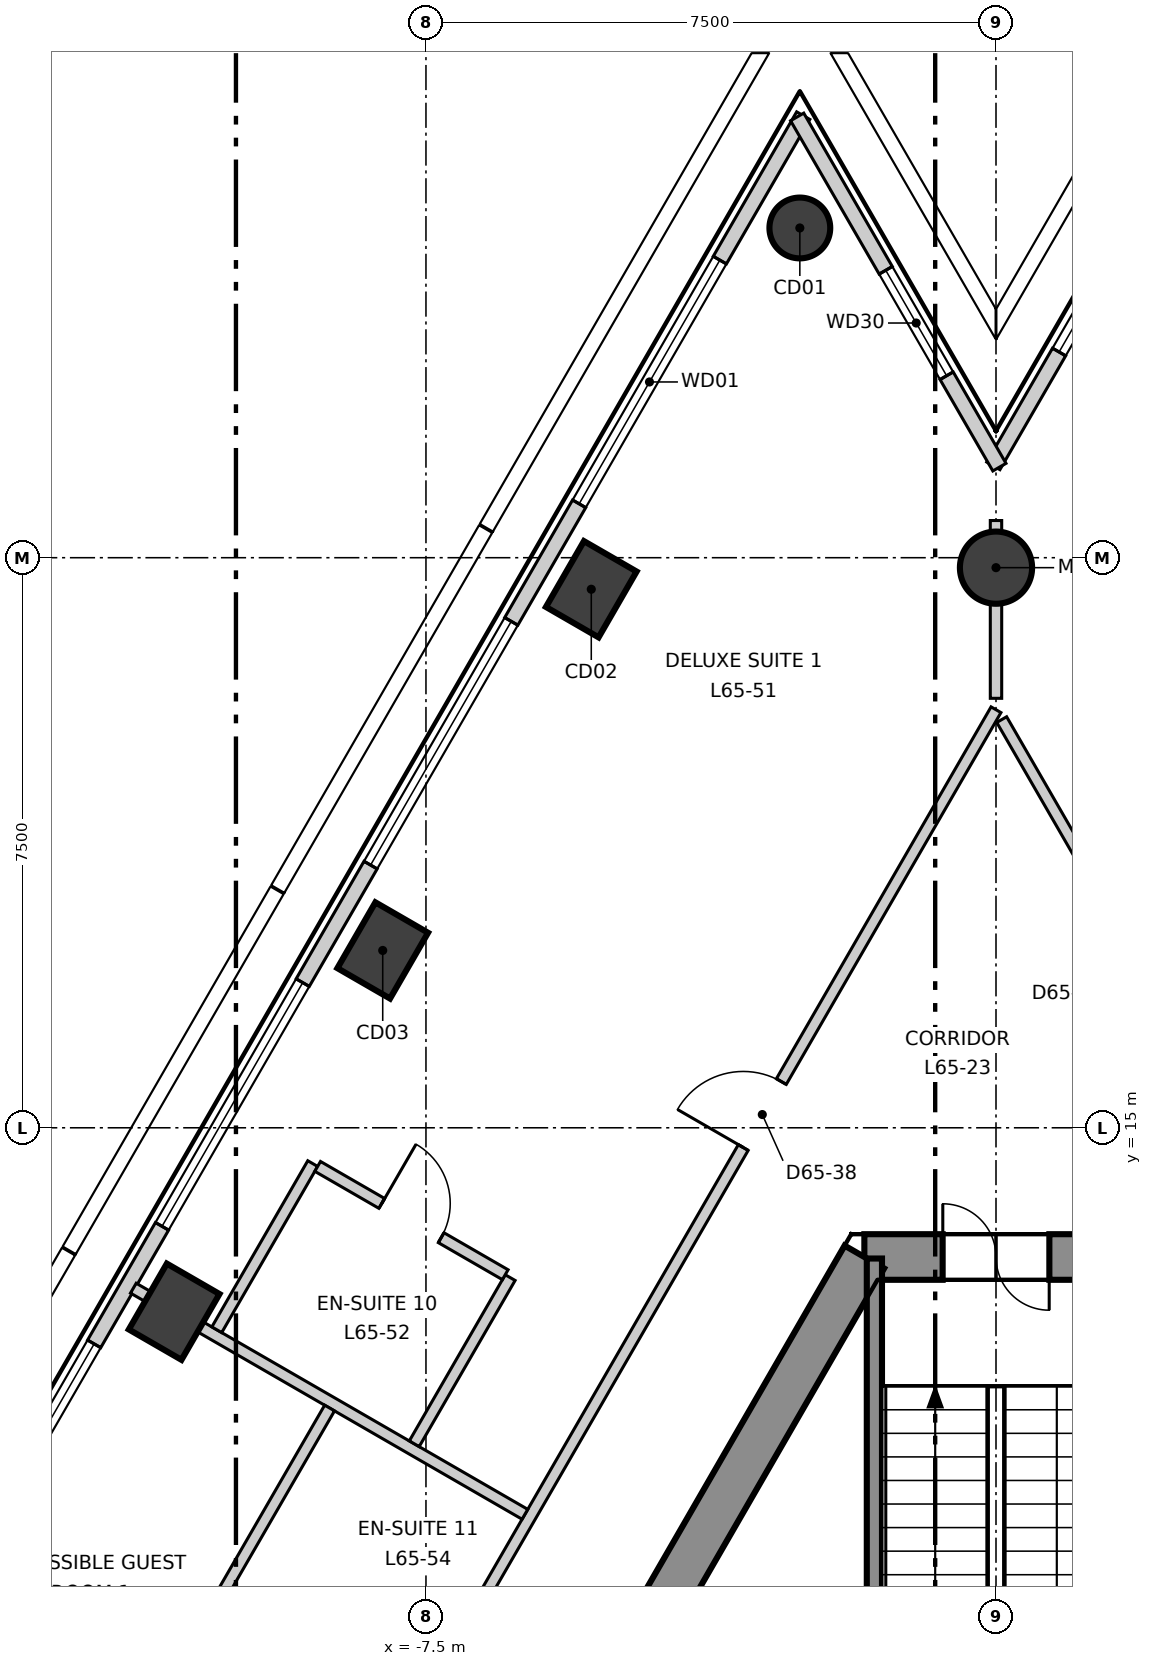
"""IFC4 building model, lengths in metres.
Left out: names, types, materials, properties, quantities, classifications, styles, units other than length and angle.
Written with IfcOpenShell. Run it as: python <this file> out.ifc"""

import sys

from ifc_helpers import new_model, si_unit, direction, frame, frame_2d, origin, origin_2d, place, context, subcontext, project, spatial, polyline, rectangle, circle, outline, extrude, element, fill, save


model = new_model("IFC4")
c1 = context("Model", 3, precision=1e-05, world=origin(), true_north=direction((0.0, 1.0)))
c2 = subcontext(c1, "Body", "Model", "MODEL_VIEW")
j1 = project(units=[si_unit("LENGTHUNIT", "METRE"), si_unit("PLANEANGLEUNIT", "RADIAN")], contexts=[c1])
p1 = place(None, origin())
s1 = spatial("IfcSite", under=j1, at=p1, CompositionType="ELEMENT")
p2 = place(p1, origin())
s2 = spatial("IfcBuilding", under=s1, at=p2, CompositionType="ELEMENT")
p3 = place(p2, frame((0.0, 0.0, 279.1)))
s3 = spatial("IfcBuildingStorey", under=s2, at=p3, CompositionType="ELEMENT", Elevation=279.1)
p4 = place(p3, frame((1.732, 13.3, -0.3), z_axis=(0.0, 0.0, 1.0), x_axis=(-1.0, 0.0, 0.0)))
e1 = element("IfcWall", 1, at=p4, inside=s3, PredefinedType="SHEAR", context=c2, shape_type="SweptSolid", body=[
    extrude(outline(polyline([(-0.173, -0.3), (1.732, -0.3), (3.637, -0.3), (3.291, 0.3), (1.732, 0.3), (0.173, 0.3), (-0.173, -0.3)])), origin(), (0.0, 0.0, 1.0), 3.6),
])
p5 = place(p4, frame((1.032, 0.0, 0.3)))
e2 = element("IfcOpeningElement", 2, at=p5, cuts=e1, PredefinedType="OPENING", context=c2, shape_type="SweptSolid", body=[
    extrude(rectangle(XDim=1.4, YDim=2.1, at=frame_2d((0.7, 1.05))), frame((0.0, 0.31, 0.0), z_axis=(0.0, -1.0, 0.0), x_axis=(1.0, 0.0, 0.0)), (0.0, 0.0, 1.0), 0.62),
])
p6 = place(p3, frame((-1.732, 13.3, -0.3), z_axis=(0.0, 0.0, 1.0), x_axis=(-0.500000539815, -0.866025092122, 0.0)))
e3 = element("IfcWall", 3, at=p6, inside=s3, PredefinedType="SHEAR", context=c2, shape_type="SweptSolid", body=[
    extrude(outline(polyline([(-0.173, -0.3), (1.795, -0.3), (3.763, -0.3), (5.732, -0.3), (7.7, -0.3), (9.668, -0.301), (11.637, -0.301), (13.605, -0.301), (15.573, -0.301), (17.542, -0.301), (19.51, -0.301), (21.478, -0.301), (21.131, 0.3), (19.226, 0.3), (17.321, 0.3), (15.415, 0.3), (13.51, 0.3), (11.605, 0.3), (9.699, 0.3), (7.794, 0.3), (5.889, 0.3), (3.984, 0.3), (2.078, 0.3), (0.173, 0.3), (-0.173, -0.3)])), origin(), (0.0, 0.0, 1.0), 3.6),
])
p7 = place(p6, frame((10.102, 0.0, 0.3)))
e4 = element("IfcOpeningElement", 4, at=p7, cuts=e3, PredefinedType="OPENING", context=c2, shape_type="SweptSolid", body=[
    extrude(rectangle(XDim=1.1, YDim=2.1, at=frame_2d((0.55, 1.05))), frame((0.0, 0.31, 0.0), z_axis=(0.0, -1.0, 0.0), x_axis=(1.0, 0.0, 0.0)), (0.0, 0.0, 1.0), 0.621),
])
p8 = place(p6, frame((15.627, 0.0, 0.3)))
e5 = element("IfcOpeningElement", 5, at=p8, cuts=e3, PredefinedType="OPENING", context=c2, shape_type="SweptSolid", body=[
    extrude(rectangle(XDim=0.9, YDim=2.1, at=frame_2d((0.45, 1.05))), frame((0.0, 0.31, 0.0), z_axis=(0.0, -1.0, 0.0), x_axis=(1.0, 0.0, 0.0)), (0.0, 0.0, 1.0), 0.621),
])
p9 = place(p3, frame((-2.581, 26.838, -0.3), z_axis=(0.0, 0.0, 1.0), x_axis=(0.5, 0.866025403784, 0.0)))
e6 = element("IfcColumn", 6, at=p9, inside=s3, PredefinedType="COLUMN", context=c2, shape_type="SweptSolid", body=[
    extrude(circle(Radius=0.4, at=origin_2d()), origin(), (0.0, 0.0, 1.0), 3.6),
])
for number, where, z_axis, x_axis in (
    (7, (-5.325, 22.085, -0.3), (0.0, 0.0, 1.0), (0.5, 0.866, 0.0)),
    (8, (-8.069, 17.333, -0.3), (0.0, 0.0, 1.0), (0.5, 0.866, 0.0)),
    (9, (-10.813, 12.58, -0.3), (0.0, 0.0, 1.0), (0.5, 0.866, 0.0)),
):
    element("IfcColumn", number, at=place(p3, frame(where, z_axis=z_axis, x_axis=x_axis)), inside=s3, PredefinedType="COLUMN", context=c2, shape_type="SweptSolid", body=[
        extrude(rectangle(XDim=1.0, YDim=0.8, at=origin_2d()), origin(), (0.0, 0.0, 1.0), 3.6),
    ])
p10 = place(p3, frame((0.0, 22.369, -0.3), z_axis=(0.0, 0.0, 1.0), x_axis=(1.0, 0.0, 0.0)))
e10 = element("IfcColumn", 10, at=p10, inside=s3, PredefinedType="COLUMN", context=c2, shape_type="SweptSolid", body=[
    extrude(circle(Radius=0.475, at=origin_2d()), origin(), (0.0, 0.0, 1.0), 3.6),
])
p11 = place(p3, frame((-2.536, 28.316, 0.0), z_axis=(0.0, 0.0, 1.0), x_axis=(-0.500006870765, -0.86602143691, 0.0)))
e11 = element("IfcWall", 11, at=p11, inside=s3, PredefinedType="ELEMENTEDWALL", context=c2, shape_type="SweptSolid", body=[
    extrude(rectangle(XDim=46.49, YDim=0.2, at=frame_2d((23.245, 0.0))), origin(), (0.0, 0.0, 1.0), 3.3),
])
p12 = place(p11, frame((2.196, 0.0, 0.9)))
e12 = element("IfcOpeningElement", 12, at=p12, cuts=e11, PredefinedType="OPENING", context=c2, shape_type="SweptSolid", body=[
    extrude(rectangle(XDim=3.7, YDim=2.2, at=frame_2d((1.85, 1.1))), frame((0.0, 0.11, 0.0), z_axis=(0.0, -1.0, 0.0), x_axis=(1.0, 0.0, 0.0)), (0.0, 0.0, 1.0), 0.22),
])
p13 = place(p11, frame((7.684, 0.0, 0.9)))
e13 = element("IfcOpeningElement", 13, at=p13, cuts=e11, PredefinedType="OPENING", context=c2, shape_type="SweptSolid", body=[
    extrude(rectangle(XDim=3.7, YDim=2.2, at=frame_2d((1.85, 1.1))), frame((0.0, 0.11, 0.0), z_axis=(0.0, -1.0, 0.0), x_axis=(1.0, 0.0, 0.0)), (0.0, 0.0, 1.0), 0.22),
])
p14 = place(p11, frame((13.172, 0.0, 0.9)))
e14 = element("IfcOpeningElement", 14, at=p14, cuts=e11, PredefinedType="OPENING", context=c2, shape_type="SweptSolid", body=[
    extrude(rectangle(XDim=3.7, YDim=2.2, at=frame_2d((1.85, 1.1))), frame((0.0, 0.11, 0.0), z_axis=(0.0, -1.0, 0.0), x_axis=(1.0, 0.0, 0.0)), (0.0, 0.0, 1.0), 0.22),
])
p15 = place(p11, frame((18.66, 0.0, 0.9)))
e15 = element("IfcOpeningElement", 15, at=p15, cuts=e11, PredefinedType="OPENING", context=c2, shape_type="SweptSolid", body=[
    extrude(rectangle(XDim=3.7, YDim=2.2, at=frame_2d((1.85, 1.1))), frame((0.0, 0.11, 0.0), z_axis=(0.0, -1.0, 0.0), x_axis=(1.0, 0.0, 0.0)), (0.0, 0.0, 1.0), 0.22),
])
p16 = place(p11, frame((24.148, 0.0, 0.9)))
e16 = element("IfcOpeningElement", 16, at=p16, cuts=e11, PredefinedType="OPENING", context=c2, shape_type="SweptSolid", body=[
    extrude(rectangle(XDim=3.7, YDim=2.2, at=frame_2d((1.85, 1.1))), frame((0.0, 0.11, 0.0), z_axis=(0.0, -1.0, 0.0), x_axis=(1.0, 0.0, 0.0)), (0.0, 0.0, 1.0), 0.22),
])
p17 = place(p11, frame((29.636, 0.0, 0.9)))
e17 = element("IfcOpeningElement", 17, at=p17, cuts=e11, PredefinedType="OPENING", context=c2, shape_type="SweptSolid", body=[
    extrude(rectangle(XDim=3.7, YDim=2.2, at=frame_2d((1.85, 1.1))), frame((0.0, 0.11, 0.0), z_axis=(0.0, -1.0, 0.0), x_axis=(1.0, 0.0, 0.0)), (0.0, 0.0, 1.0), 0.22),
])
p18 = place(p11, frame((35.124, 0.0, 0.9)))
e18 = element("IfcOpeningElement", 18, at=p18, cuts=e11, PredefinedType="OPENING", context=c2, shape_type="SweptSolid", body=[
    extrude(rectangle(XDim=3.7, YDim=2.2, at=frame_2d((1.85, 1.1))), frame((0.0, 0.11, 0.0), z_axis=(0.0, -1.0, 0.0), x_axis=(1.0, 0.0, 0.0)), (0.0, 0.0, 1.0), 0.22),
])
p19 = place(p11, frame((40.612, 0.0, 0.9)))
e19 = element("IfcOpeningElement", 19, at=p19, cuts=e11, PredefinedType="OPENING", context=c2, shape_type="SweptSolid", body=[
    extrude(rectangle(XDim=3.7, YDim=2.2, at=frame_2d((1.85, 1.1))), frame((0.0, 0.11, 0.0), z_axis=(0.0, -1.0, 0.0), x_axis=(1.0, 0.0, 0.0)), (0.0, 0.0, 1.0), 0.22),
])
p20 = place(p3, frame((2.626, 28.316, 0.0), z_axis=(0.0, 0.0, 1.0), x_axis=(-0.500071953966, -0.865983857157, 0.0)))
e20 = element("IfcWall", 20, at=p20, inside=s3, PredefinedType="ELEMENTEDWALL", context=c2, shape_type="SweptSolid", body=[
    extrude(rectangle(XDim=5.321, YDim=0.2, at=frame_2d((2.661, 0.0))), origin(), (0.0, 0.0, 1.0), 3.3),
])
p21 = place(p20, frame((1.99, 0.0, 0.9)))
e21 = element("IfcOpeningElement", 21, at=p21, cuts=e20, PredefinedType="OPENING", context=c2, shape_type="SweptSolid", body=[
    extrude(rectangle(XDim=1.6, YDim=2.2, at=frame_2d((0.8, 1.1))), frame((0.0, 0.11, 0.0), z_axis=(0.0, -1.0, 0.0), x_axis=(1.0, 0.0, 0.0)), (0.0, 0.0, 1.0), 0.22),
])
p22 = place(p3, frame((0.045, 23.691, 0.0), z_axis=(0.0, 0.0, 1.0), x_axis=(-0.500052085069, 0.865995330367, 0.0)))
e22 = element("IfcWall", 22, at=p22, inside=s3, PredefinedType="ELEMENTEDWALL", context=c2, shape_type="SweptSolid", body=[
    extrude(rectangle(XDim=5.321, YDim=0.2, at=frame_2d((2.661, 0.0))), origin(), (0.0, 0.0, 1.0), 3.3),
])
p23 = place(p22, frame((1.39, 0.0, 0.9)))
e23 = element("IfcOpeningElement", 23, at=p23, cuts=e22, PredefinedType="OPENING", context=c2, shape_type="SweptSolid", body=[
    extrude(rectangle(XDim=1.6, YDim=2.2, at=frame_2d((0.8, 1.1))), frame((0.0, 0.11, 0.0), z_axis=(0.0, -1.0, 0.0), x_axis=(1.0, 0.0, 0.0)), (0.0, 0.0, 1.0), 0.22),
])
p24 = place(p3, frame((-17.678, -10.119, 0.0), z_axis=(0.0, 0.0, 1.0), x_axis=(0.500003190174, 0.866023561929, 0.0)))
e24 = element("IfcWall", 24, at=p24, inside=s3, PredefinedType="PARTITIONING", context=c2, shape_type="SweptSolid", body=[
    extrude(rectangle(XDim=35.356, YDim=0.15, at=frame_2d((17.678, 0.0))), origin(), (0.0, 0.0, 1.0), 3.3),
])
p25 = place(p24, frame((28.706, 0.0, 0.0)))
e25 = element("IfcOpeningElement", 25, at=p25, cuts=e24, PredefinedType="OPENING", context=c2, shape_type="SweptSolid", body=[
    extrude(rectangle(XDim=1.0, YDim=2.1, at=frame_2d((0.5, 1.05))), frame((0.0, 0.085, 0.0), z_axis=(0.0, -1.0, 0.0), x_axis=(1.0, 0.0, 0.0)), (0.0, 0.0, 1.0), 0.17),
])
p26 = place(p24, frame((18.74, 0.0, 0.0)))
e26 = element("IfcOpeningElement", 26, at=p26, cuts=e24, PredefinedType="OPENING", context=c2, shape_type="SweptSolid", body=[
    extrude(rectangle(XDim=1.0, YDim=2.1, at=frame_2d((0.5, 1.05))), frame((0.0, 0.085, 0.0), z_axis=(0.0, -1.0, 0.0), x_axis=(1.0, 0.0, 0.0)), (0.0, 0.0, 1.0), 0.17),
])
p27 = place(p24, frame((9.352, 0.0, 0.0)))
e27 = element("IfcOpeningElement", 27, at=p27, cuts=e24, PredefinedType="OPENING", context=c2, shape_type="SweptSolid", body=[
    extrude(rectangle(XDim=1.0, YDim=2.1, at=frame_2d((0.5, 1.05))), frame((0.0, 0.085, 0.0), z_axis=(0.0, -1.0, 0.0), x_axis=(1.0, 0.0, 0.0)), (0.0, 0.0, 1.0), 0.17),
])
p28 = place(p24, frame((2.777, 0.0, 0.0)))
e28 = element("IfcOpeningElement", 28, at=p28, cuts=e24, PredefinedType="OPENING", context=c2, shape_type="SweptSolid", body=[
    extrude(rectangle(XDim=1.0, YDim=2.1, at=frame_2d((0.5, 1.05))), frame((0.0, 0.085, 0.0), z_axis=(0.0, -1.0, 0.0), x_axis=(1.0, 0.0, 0.0)), (0.0, 0.0, 1.0), 0.17),
])
p29 = place(p3, frame((-11.35, 12.89, 0.0), z_axis=(0.0, 0.0, 1.0), x_axis=(0.866004483474, -0.50003623329, 0.0)))
e29 = element("IfcWall", 29, at=p29, inside=s3, PredefinedType="PARTITIONING", context=c2, shape_type="SweptSolid", body=[
    extrude(rectangle(XDim=5.949, YDim=0.15, at=frame_2d((2.975, 0.0))), origin(), (0.0, 0.0, 1.0), 3.3),
])
p30 = place(p3, frame((0.0, 20.65, 0.0), z_axis=(0.0, 0.0, 1.0), x_axis=(0.0, 1.0, 0.0)))
e30 = element("IfcWall", 30, at=p30, inside=s3, PredefinedType="PARTITIONING", context=c2, shape_type="SweptSolid", body=[
    extrude(rectangle(XDim=2.339, YDim=0.15, at=frame_2d((1.169, 0.0))), origin(), (0.0, 0.0, 1.0), 2.8),
])
p31 = place(p3, frame((0.075, 20.37, 0.0), z_axis=(0.0, 0.0, 1.0), x_axis=(0.500003985697, -0.866023102629, 0.0)))
e31 = element("IfcWall", 31, at=p31, inside=s3, PredefinedType="PARTITIONING", context=c2, shape_type="SweptSolid", body=[
    extrude(rectangle(XDim=35.206, YDim=0.15, at=frame_2d((17.603, 0.0))), origin(), (0.0, 0.0, 1.0), 3.3),
])
p32 = place(p31, frame((31.506, 0.0, 0.0)))
e32 = element("IfcOpeningElement", 32, at=p32, cuts=e31, PredefinedType="OPENING", context=c2, shape_type="SweptSolid", body=[
    extrude(rectangle(XDim=1.0, YDim=2.1, at=frame_2d((0.5, 1.05))), frame((0.0, 0.085, 0.0), z_axis=(0.0, -1.0, 0.0), x_axis=(1.0, 0.0, 0.0)), (0.0, 0.0, 1.0), 0.17),
])
p33 = place(p31, frame((26.529, 0.0, 0.0)))
e33 = element("IfcOpeningElement", 33, at=p33, cuts=e31, PredefinedType="OPENING", context=c2, shape_type="SweptSolid", body=[
    extrude(rectangle(XDim=1.0, YDim=2.1, at=frame_2d((0.5, 1.05))), frame((0.0, 0.085, 0.0), z_axis=(0.0, -1.0, 0.0), x_axis=(1.0, 0.0, 0.0)), (0.0, 0.0, 1.0), 0.17),
])
p34 = place(p31, frame((19.442, 0.0, 0.0)))
e34 = element("IfcOpeningElement", 34, at=p34, cuts=e31, PredefinedType="OPENING", context=c2, shape_type="SweptSolid", body=[
    extrude(rectangle(XDim=1.0, YDim=2.1, at=frame_2d((0.5, 1.05))), frame((0.0, 0.085, 0.0), z_axis=(0.0, -1.0, 0.0), x_axis=(1.0, 0.0, 0.0)), (0.0, 0.0, 1.0), 0.17),
])
p35 = place(p31, frame((8.254, 0.0, 0.0)))
e35 = element("IfcOpeningElement", 35, at=p35, cuts=e31, PredefinedType="OPENING", context=c2, shape_type="SweptSolid", body=[
    extrude(rectangle(XDim=1.0, YDim=2.1, at=frame_2d((0.5, 1.05))), frame((0.0, 0.085, 0.0), z_axis=(0.0, -1.0, 0.0), x_axis=(1.0, 0.0, 0.0)), (0.0, 0.0, 1.0), 0.17),
])
p36 = place(p31, frame((13.754, 0.0, 0.0)))
e36 = element("IfcOpeningElement", 36, at=p36, cuts=e31, PredefinedType="OPENING", context=c2, shape_type="SweptSolid", body=[
    extrude(rectangle(XDim=0.9, YDim=2.1, at=frame_2d((0.45, 1.05))), frame((0.0, 0.085, 0.0), z_axis=(0.0, -1.0, 0.0), x_axis=(1.0, 0.0, 0.0)), (0.0, 0.0, 1.0), 0.17),
])
p37 = place(p31, frame((11.554, 0.0, 0.0)))
e37 = element("IfcOpeningElement", 37, at=p37, cuts=e31, PredefinedType="OPENING", context=c2, shape_type="SweptSolid", body=[
    extrude(rectangle(XDim=0.9, YDim=2.1, at=frame_2d((0.45, 1.05))), frame((0.0, 0.085, 0.0), z_axis=(0.0, -1.0, 0.0), x_axis=(1.0, 0.0, 0.0)), (0.0, 0.0, 1.0), 0.17),
])
p38 = place(p31, frame((2.777, 0.0, 0.0)))
e38 = element("IfcOpeningElement", 38, at=p38, cuts=e31, PredefinedType="OPENING", context=c2, shape_type="SweptSolid", body=[
    extrude(rectangle(XDim=1.0, YDim=2.1, at=frame_2d((0.5, 1.05))), frame((0.0, 0.085, 0.0), z_axis=(0.0, -1.0, 0.0), x_axis=(1.0, 0.0, 0.0)), (0.0, 0.0, 1.0), 0.17),
])
for number, where, z_axis, x_axis in (
    (39, (-7.654, 10.843, 0.0), (0.0, 0.0, 1.0), (0.5, 0.866, 0.0)),
    (40, (-10.252, 12.343, 0.0), (0.0, 0.0, 1.0), (0.5, 0.866, 0.0)),
):
    element("IfcWall", number, at=place(p3, frame(where, z_axis=z_axis, x_axis=x_axis)), inside=s3, PredefinedType="PARTITIONING", context=c2, shape_type="SweptSolid", body=[
        extrude(rectangle(XDim=2.524, YDim=0.15, at=frame_2d((1.262, 0.0))), origin(), (0.0, 0.0, 1.0), 3.3),
    ])
p39 = place(p3, frame((-10.231, 8.78, 0.0), z_axis=(0.0, 0.0, 1.0), x_axis=(0.500124626836, 0.865953438489, 0.0)))
e41 = element("IfcWall", 41, at=p39, inside=s3, PredefinedType="PARTITIONING", context=c2, shape_type="SweptSolid", body=[
    extrude(rectangle(XDim=2.925, YDim=0.15, at=frame_2d((1.462, 0.0))), origin(), (0.0, 0.0, 1.0), 3.3),
])
p40 = place(p3, frame((-8.925, 14.492, 0.0), z_axis=(0.0, 0.0, 1.0), x_axis=(0.866004402611, -0.500036373335, 0.0)))
e42 = element("IfcWall", 42, at=p40, inside=s3, PredefinedType="PARTITIONING", context=c2, shape_type="SweptSolid", body=[
    extrude(rectangle(XDim=2.85, YDim=0.15, at=frame_2d((1.425, 0.0))), origin(), (0.0, 0.0, 1.0), 3.3),
])
p41 = place(p40, frame((0.975, 0.0, 0.0)))
e43 = element("IfcOpeningElement", 43, at=p41, cuts=e42, PredefinedType="OPENING", context=c2, shape_type="SweptSolid", body=[
    extrude(rectangle(XDim=0.9, YDim=2.1, at=frame_2d((0.45, 1.05))), frame((0.0, 0.085, 0.0), z_axis=(0.0, -1.0, 0.0), x_axis=(1.0, 0.0, 0.0)), (0.0, 0.0, 1.0), 0.17),
])
p42 = place(p3, frame((-1.6, 6.615, 0.0), z_axis=(0.0, 0.0, 1.0), x_axis=(0.0, 1.0, 0.0)))
e44 = element("IfcWall", 44, at=p42, inside=s3, PredefinedType="SOLIDWALL", context=c2, shape_type="SweptSolid", body=[
    extrude(rectangle(XDim=6.665, YDim=0.2, at=frame_2d((3.333, 0.0))), origin(), (0.0, 0.0, 1.0), 3.3),
])
p43 = place(p12, origin())
e45 = element("IfcWindow", 45, at=p43, inside=s3, PartitioningType="SINGLE_PANEL", PredefinedType="WINDOW", context=c2, shape_type="SweptSolid", body=[
    extrude(rectangle(XDim=3.7, YDim=2.2, at=frame_2d((1.85, 1.1))), frame((0.0, 0.03, 0.0), z_axis=(0.0, -1.0, 0.0), x_axis=(1.0, 0.0, 0.0)), (0.0, 0.0, 1.0), 0.06),
])
fill(e12, e45)
p44 = place(p13, origin())
e46 = element("IfcWindow", 46, at=p44, inside=s3, PartitioningType="SINGLE_PANEL", PredefinedType="WINDOW", context=c2, shape_type="SweptSolid", body=[
    extrude(rectangle(XDim=3.7, YDim=2.2, at=frame_2d((1.85, 1.1))), frame((0.0, 0.03, 0.0), z_axis=(0.0, -1.0, 0.0), x_axis=(1.0, 0.0, 0.0)), (0.0, 0.0, 1.0), 0.06),
])
fill(e13, e46)
p45 = place(p14, origin())
e47 = element("IfcWindow", 47, at=p45, inside=s3, PartitioningType="SINGLE_PANEL", PredefinedType="WINDOW", context=c2, shape_type="SweptSolid", body=[
    extrude(rectangle(XDim=3.7, YDim=2.2, at=frame_2d((1.85, 1.1))), frame((0.0, 0.03, 0.0), z_axis=(0.0, -1.0, 0.0), x_axis=(1.0, 0.0, 0.0)), (0.0, 0.0, 1.0), 0.06),
])
fill(e14, e47)
p46 = place(p15, origin())
e48 = element("IfcWindow", 48, at=p46, inside=s3, PartitioningType="SINGLE_PANEL", PredefinedType="WINDOW", context=c2, shape_type="SweptSolid", body=[
    extrude(rectangle(XDim=3.7, YDim=2.2, at=frame_2d((1.85, 1.1))), frame((0.0, 0.03, 0.0), z_axis=(0.0, -1.0, 0.0), x_axis=(1.0, 0.0, 0.0)), (0.0, 0.0, 1.0), 0.06),
])
fill(e15, e48)
p47 = place(p21, origin())
e49 = element("IfcWindow", 49, at=p47, inside=s3, PartitioningType="SINGLE_PANEL", PredefinedType="WINDOW", context=c2, shape_type="SweptSolid", body=[
    extrude(rectangle(XDim=1.6, YDim=2.2, at=frame_2d((0.8, 1.1))), frame((0.0, 0.03, 0.0), z_axis=(0.0, -1.0, 0.0), x_axis=(1.0, 0.0, 0.0)), (0.0, 0.0, 1.0), 0.06),
])
fill(e21, e49)
p48 = place(p23, origin())
e50 = element("IfcWindow", 50, at=p48, inside=s3, PartitioningType="SINGLE_PANEL", PredefinedType="WINDOW", context=c2, shape_type="SweptSolid", body=[
    extrude(rectangle(XDim=1.6, YDim=2.2, at=frame_2d((0.8, 1.1))), frame((0.0, 0.03, 0.0), z_axis=(0.0, -1.0, 0.0), x_axis=(1.0, 0.0, 0.0)), (0.0, 0.0, 1.0), 0.06),
])
fill(e23, e50)
p49 = place(p25, origin())
e51 = element("IfcDoor", 51, at=p49, inside=s3, OperationType="SINGLE_SWING_RIGHT", PredefinedType="DOOR", context=c2, shape_type="SweptSolid", body=[
    extrude(rectangle(XDim=1.0, YDim=2.1, at=frame_2d((0.5, 1.05))), frame((0.0, 0.025, 0.0), z_axis=(0.0, -1.0, 0.0), x_axis=(1.0, 0.0, 0.0)), (0.0, 0.0, 1.0), 0.05),
])
fill(e25, e51)
p50 = place(p41, origin())
e52 = element("IfcDoor", 52, at=p50, inside=s3, OperationType="SINGLE_SWING_RIGHT", PredefinedType="DOOR", context=c2, shape_type="SweptSolid", body=[
    extrude(rectangle(XDim=0.9, YDim=2.1, at=frame_2d((0.45, 1.05))), frame((0.0, 0.025, 0.0), z_axis=(0.0, -1.0, 0.0), x_axis=(1.0, 0.0, 0.0)), (0.0, 0.0, 1.0), 0.05),
])
fill(e43, e52)
p51 = place(p5, origin())
e53 = element("IfcDoor", 53, at=p51, inside=s3, OperationType="DOUBLE_DOOR_SINGLE_SWING", PredefinedType="DOOR", context=c2, shape_type="SweptSolid", body=[
    extrude(rectangle(XDim=1.4, YDim=2.1, at=frame_2d((0.7, 1.05))), frame((0.0, 0.025, 0.0), z_axis=(0.0, -1.0, 0.0), x_axis=(1.0, 0.0, 0.0)), (0.0, 0.0, 1.0), 0.05),
])
fill(e2, e53)
save(model, sys.argv[1])
